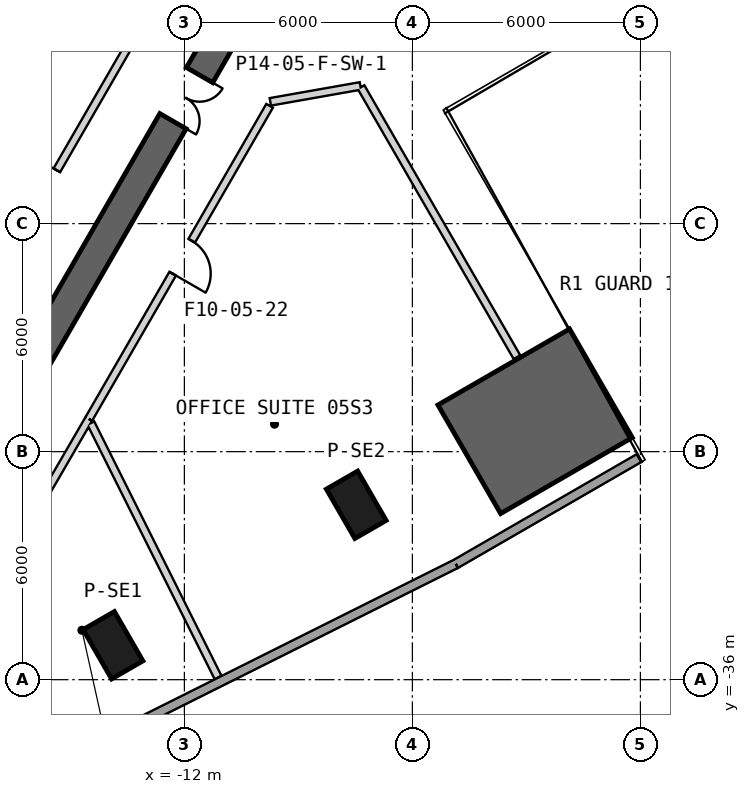
"""IFC4 building model, lengths in metres.
Left out: names, types, materials, properties, quantities, classifications, styles, units other than length and angle.
Written with IfcOpenShell. Run it as: python <this file> out.ifc"""

import sys

from ifc_helpers import new_model, si_unit, direction, frame, frame_2d, origin, origin_2d, place, context, subcontext, project, spatial, polyline, rectangle, outline, extrude, element, fill, save


model = new_model("IFC4")
c1 = context("Model", 3, precision=1e-05, world=origin(), true_north=direction((0.0, 1.0)))
c2 = subcontext(c1, "Body", "Model", "MODEL_VIEW")
j1 = project(units=[si_unit("LENGTHUNIT", "METRE"), si_unit("PLANEANGLEUNIT", "RADIAN")], contexts=[c1])
p1 = place(None, origin())
s1 = spatial("IfcSite", under=j1, at=p1, CompositionType="ELEMENT")
p2 = place(p1, origin())
s2 = spatial("IfcBuilding", under=s1, at=p2, CompositionType="ELEMENT")
p3 = place(p2, frame((0.0, 0.0, 33.5)))
s3 = spatial("IfcBuildingStorey", under=s2, at=p3, CompositionType="ELEMENT", Elevation=33.5)
for number, where, z_axis, x_axis in (
    (1, (-13.878, -35.094, 0.0), (0.0, 0.0, 1.0), (0.5, -0.866, 0.0)),
    (2, (-7.477, -31.398, 0.0), (0.0, 0.0, 1.0), (0.5, -0.866, 0.0)),
):
    element("IfcColumn", number, at=place(p3, frame(where, z_axis=z_axis, x_axis=x_axis)), inside=s3, PredefinedType="COLUMN", context=c2, shape_type="SweptSolid", body=[
        extrude(rectangle(XDim=1.5, YDim=0.95, at=origin_2d()), origin(), (0.0, 0.0, 1.0), 6.0),
    ])
p4 = place(p3, frame((-10.575, -18.316, 0.0), z_axis=(0.0, 0.0, 1.0), x_axis=(-0.499996575515, -0.866027380903, 0.0)))
e3 = element("IfcWall", 3, at=p4, inside=s3, PredefinedType="SHEAR", context=c2, shape_type="SweptSolid", body=[
    extrude(rectangle(XDim=13.954, YDim=0.8, at=frame_2d((6.977, 0.0))), origin(), (0.0, 0.0, 1.0), 6.0),
])
p5 = place(p4, frame((2.05, 0.0, 0.0)))
e4 = element("IfcOpeningElement", 4, at=p5, cuts=e3, PredefinedType="OPENING", context=c2, shape_type="SweptSolid", body=[
    extrude(rectangle(XDim=1.4, YDim=2.4, at=frame_2d((0.7, 1.2))), frame((0.0, 0.41, 0.0), z_axis=(0.0, -1.0, 0.0), x_axis=(1.0, 0.0, 0.0)), (0.0, 0.0, 1.0), 0.82),
])
p6 = place(p3, origin())
e5 = element("IfcWall", 5, at=p6, inside=s3, PredefinedType="SHEAR", context=c2, shape_type="SweptSolid", body=[
    extrude(outline(polyline([(-3.678, -31.63), (-0.214, -29.63), (-1.864, -26.772), (-5.328, -28.772), (-3.678, -31.63)])), origin(), (0.0, 0.0, 1.0), 6.0),
])
p7 = place(p3, frame((-17.203, -39.128, 0.0), z_axis=(0.0, 0.0, 1.0), x_axis=(0.894377655106, 0.447312653573, 0.0)))
e6 = element("IfcWall", 6, at=p7, inside=s3, PredefinedType="SOLIDWALL", context=c2, shape_type="SweptSolid", body=[
    extrude(rectangle(XDim=13.802, YDim=0.24, at=frame_2d((6.901, 0.0))), origin(), (0.0, 0.0, 1.0), 5.65),
])
p8 = place(p3, frame((-4.859, -32.954, 0.0), z_axis=(0.0, 0.0, 1.0), x_axis=(0.865999312459, 0.500045188778, 0.0)))
e7 = element("IfcWall", 7, at=p8, inside=s3, PredefinedType="SOLIDWALL", context=c2, shape_type="SweptSolid", body=[
    extrude(rectangle(XDim=5.566, YDim=0.24, at=frame_2d((2.783, 0.0))), origin(), (0.0, 0.0, 1.0), 5.65),
])
p9 = place(p3, frame((-17.98, -27.143, 0.0), z_axis=(0.0, 0.0, 1.0), x_axis=(0.499987665054, 0.866032525252, 0.0)))
e8 = element("IfcWall", 8, at=p9, inside=s3, PredefinedType="PARTITIONING", context=c2, shape_type="SweptSolid", body=[
    extrude(rectangle(XDim=9.695, YDim=0.2, at=frame_2d((4.848, 0.0))), origin(), (0.0, 0.0, 1.0), 5.65),
])
p10 = place(p9, frame((4.249, 0.0, 0.0)))
e9 = element("IfcOpeningElement", 9, at=p10, cuts=e8, PredefinedType="OPENING", context=c2, shape_type="SweptSolid", body=[
    extrude(rectangle(XDim=1.0, YDim=2.1, at=frame_2d((0.5, 1.05))), frame((0.0, 0.11, 0.0), z_axis=(0.0, -1.0, 0.0), x_axis=(1.0, 0.0, 0.0)), (0.0, 0.0, 1.0), 0.22),
])
p11 = place(p3, frame((-14.514, -29.139, 0.0), z_axis=(0.0, 0.0, 1.0), x_axis=(-0.502061989067, -0.864831636294, 0.0)))
e10 = element("IfcWall", 10, at=p11, inside=s3, PredefinedType="PARTITIONING", context=c2, shape_type="SweptSolid", body=[
    extrude(rectangle(XDim=11.855, YDim=0.2, at=frame_2d((5.928, 0.0))), origin(), (0.0, 0.0, 1.0), 5.65),
])
p12 = place(p11, frame((5.421, 0.0, 0.0)))
e11 = element("IfcOpeningElement", 11, at=p12, cuts=e10, PredefinedType="OPENING", context=c2, shape_type="SweptSolid", body=[
    extrude(rectangle(XDim=1.0, YDim=2.1, at=frame_2d((0.5, 1.05))), frame((0.0, 0.11, 0.0), z_axis=(0.0, -1.0, 0.0), x_axis=(1.0, 0.0, 0.0)), (0.0, 0.0, 1.0), 0.22),
])
p13 = place(p3, frame((-9.738, -20.796, 0.0), z_axis=(0.0, 0.0, 1.0), x_axis=(0.984780494406, 0.173802698013, 0.0)))
e12 = element("IfcWall", 12, at=p13, inside=s3, PredefinedType="PARTITIONING", context=c2, shape_type="SweptSolid", body=[
    extrude(rectangle(XDim=2.406, YDim=0.2, at=frame_2d((1.203, 0.0))), origin(), (0.0, 0.0, 1.0), 4.73),
])
p14 = place(p3, frame((-9.758, -20.901, 0.0), z_axis=(0.0, 0.0, 1.0), x_axis=(-0.499997931106, -0.866026598257, 0.0)))
e13 = element("IfcWall", 13, at=p14, inside=s3, PredefinedType="PARTITIONING", context=c2, shape_type="SweptSolid", body=[
    extrude(rectangle(XDim=9.513, YDim=0.2, at=frame_2d((4.756, 0.0))), origin(), (0.0, 0.0, 1.0), 5.65),
])
p15 = place(p14, frame((4.1, 0.0, 0.0)))
e14 = element("IfcOpeningElement", 14, at=p15, cuts=e13, PredefinedType="OPENING", context=c2, shape_type="SweptSolid", body=[
    extrude(rectangle(XDim=1.0, YDim=2.1, at=frame_2d((0.5, 1.05))), frame((0.0, 0.11, 0.0), z_axis=(0.0, -1.0, 0.0), x_axis=(1.0, 0.0, 0.0)), (0.0, 0.0, 1.0), 0.22),
])
p16 = place(p3, frame((-7.35, -20.409, 0.0), z_axis=(0.0, 0.0, 1.0), x_axis=(0.500015278874, -0.866016582343, 0.0)))
e15 = element("IfcWall", 15, at=p16, inside=s3, PredefinedType="PARTITIONING", context=c2, shape_type="SweptSolid", body=[
    extrude(rectangle(XDim=8.203, YDim=0.2, at=frame_2d((4.102, 0.0))), origin(), (0.0, 0.0, 1.0), 4.83),
])
p17 = place(p3, frame((-14.462, -29.248, 0.0), z_axis=(0.0, 0.0, 1.0), x_axis=(0.447304919826, -0.894381523009, 0.0)))
e16 = element("IfcWall", 16, at=p17, inside=s3, PredefinedType="PARTITIONING", context=c2, shape_type="SweptSolid", body=[
    extrude(rectangle(XDim=7.485, YDim=0.2, at=frame_2d((3.743, 0.0))), origin(), (0.0, 0.0, 1.0), 4.73),
])
p18 = place(p10, origin())
e17 = element("IfcDoor", 17, at=p18, inside=s3, OperationType="SINGLE_SWING_RIGHT", PredefinedType="USERDEFINED", context=c2, shape_type="SweptSolid", body=[
    extrude(rectangle(XDim=1.0, YDim=2.1, at=frame_2d((0.5, 1.05))), frame((0.0, 0.025, 0.0), z_axis=(0.0, -1.0, 0.0), x_axis=(1.0, 0.0, 0.0)), (0.0, 0.0, 1.0), 0.05),
])
fill(e9, e17)
p19 = place(p15, origin())
e18 = element("IfcDoor", 18, at=p19, inside=s3, OperationType="SINGLE_SWING_RIGHT", PredefinedType="USERDEFINED", context=c2, shape_type="SweptSolid", body=[
    extrude(rectangle(XDim=1.0, YDim=2.1, at=frame_2d((0.5, 1.05))), frame((0.0, 0.025, 0.0), z_axis=(0.0, -1.0, 0.0), x_axis=(1.0, 0.0, 0.0)), (0.0, 0.0, 1.0), 0.05),
])
fill(e14, e18)
p20 = place(p5, origin())
e19 = element("IfcDoor", 19, at=p20, inside=s3, OperationType="DOUBLE_DOOR_SINGLE_SWING", PredefinedType="NOTDEFINED", context=c2, shape_type="SweptSolid", body=[
    extrude(rectangle(XDim=1.4, YDim=2.4, at=frame_2d((0.7, 1.2))), frame((0.0, 0.025, 0.0), z_axis=(0.0, -1.0, 0.0), x_axis=(1.0, 0.0, 0.0)), (0.0, 0.0, 1.0), 0.05),
])
fill(e4, e19)
save(model, sys.argv[1])
